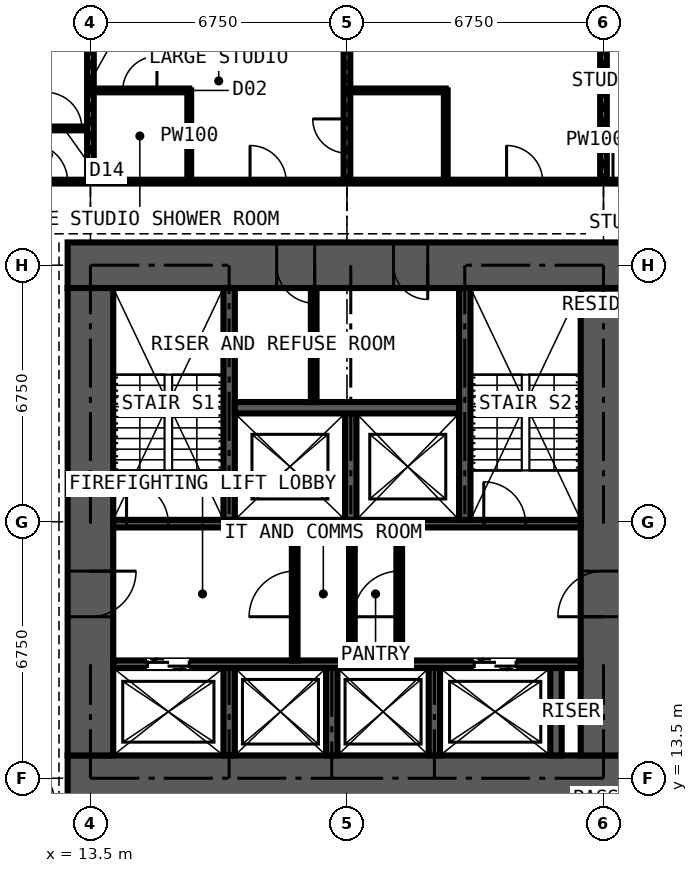
"""IFC4 building model, lengths in metres.
Left out: names, types, materials, properties, quantities, classifications, styles, units other than length and angle.
Written with IfcOpenShell. Run it as: python <this file> out.ifc"""

import sys

from ifc_helpers import new_model, si_unit, direction, frame, frame_2d, origin, place, context, subcontext, project, spatial, rectangle, extrude, element, fill, save


model = new_model("IFC4")
c1 = context("Model", 3, precision=1e-05, world=origin(), true_north=direction((0.0, 1.0)))
c2 = subcontext(c1, "Body", "Model", "MODEL_VIEW")
j1 = project(units=[si_unit("LENGTHUNIT", "METRE"), si_unit("PLANEANGLEUNIT", "RADIAN")], contexts=[c1])
p1 = place(None, origin())
s1 = spatial("IfcSite", under=j1, at=p1, CompositionType="ELEMENT")
p2 = place(p1, origin())
s2 = spatial("IfcBuilding", under=s1, at=p2, CompositionType="ELEMENT")
p3 = place(p2, frame((0.0, 0.0, 112.5)))
s3 = spatial("IfcBuildingStorey", under=s2, at=p3, CompositionType="ELEMENT", Elevation=112.5)
p4 = place(p3, frame((12.9, 13.5, 0.0), z_axis=(0.0, 0.0, 1.0), x_axis=(1.0, 0.0, 0.0)))
e1 = element("IfcWall", 1, at=p4, inside=s3, PredefinedType="SHEAR", context=c2, shape_type="SweptSolid", body=[
    extrude(rectangle(XDim=14.7, YDim=1.2, at=frame_2d((7.35, 0.0))), origin(), (0.0, 0.0, 1.0), 3.6),
])
p5 = place(p3, frame((27.0, 14.1, 0.0), z_axis=(0.0, 0.0, 1.0), x_axis=(0.0, 1.0, 0.0)))
e2 = element("IfcWall", 2, at=p5, inside=s3, PredefinedType="SHEAR", context=c2, shape_type="SweptSolid", body=[
    extrude(rectangle(XDim=12.3, YDim=1.2, at=frame_2d((6.15, 0.0))), origin(), (0.0, 0.0, 1.0), 3.6),
])
p6 = place(p5, frame((3.65, 0.0, 0.0)))
e3 = element("IfcOpeningElement", 3, at=p6, cuts=e2, PredefinedType="OPENING", context=c2, shape_type="SweptSolid", body=[
    extrude(rectangle(XDim=1.2, YDim=2.2, at=frame_2d((0.6, 1.1))), frame((0.0, 0.61, 0.0), z_axis=(0.0, -1.0, 0.0), x_axis=(1.0, 0.0, 0.0)), (0.0, 0.0, 1.0), 1.22),
])
p7 = place(p3, frame((27.6, 27.0, 0.0), z_axis=(0.0, 0.0, 1.0), x_axis=(-1.0, 0.0, 0.0)))
e4 = element("IfcWall", 4, at=p7, inside=s3, PredefinedType="SHEAR", context=c2, shape_type="SweptSolid", body=[
    extrude(rectangle(XDim=14.7, YDim=1.2, at=frame_2d((7.35, 0.0))), origin(), (0.0, 0.0, 1.0), 3.6),
])
p8 = place(p7, frame((5.225, 0.0, 0.0)))
e5 = element("IfcOpeningElement", 5, at=p8, cuts=e4, PredefinedType="OPENING", context=c2, shape_type="SweptSolid", body=[
    extrude(rectangle(XDim=0.9, YDim=2.2, at=frame_2d((0.45, 1.1))), frame((0.0, 0.61, 0.0), z_axis=(0.0, -1.0, 0.0), x_axis=(1.0, 0.0, 0.0)), (0.0, 0.0, 1.0), 1.22),
])
p9 = place(p7, frame((8.2, 0.0, 0.0)))
e6 = element("IfcOpeningElement", 6, at=p9, cuts=e4, PredefinedType="OPENING", context=c2, shape_type="SweptSolid", body=[
    extrude(rectangle(XDim=1.0, YDim=2.2, at=frame_2d((0.5, 1.1))), frame((0.0, 0.61, 0.0), z_axis=(0.0, -1.0, 0.0), x_axis=(1.0, 0.0, 0.0)), (0.0, 0.0, 1.0), 1.22),
])
p10 = place(p3, frame((13.5, 26.4, 0.0), z_axis=(0.0, 0.0, 1.0), x_axis=(0.0, -1.0, 0.0)))
e7 = element("IfcWall", 7, at=p10, inside=s3, PredefinedType="SHEAR", context=c2, shape_type="SweptSolid", body=[
    extrude(rectangle(XDim=12.3, YDim=1.2, at=frame_2d((6.15, 0.0))), origin(), (0.0, 0.0, 1.0), 3.6),
])
p11 = place(p10, frame((7.45, 0.0, 0.0)))
e8 = element("IfcOpeningElement", 8, at=p11, cuts=e7, PredefinedType="OPENING", context=c2, shape_type="SweptSolid", body=[
    extrude(rectangle(XDim=1.2, YDim=2.2, at=frame_2d((0.6, 1.1))), frame((0.0, 0.61, 0.0), z_axis=(0.0, -1.0, 0.0), x_axis=(1.0, 0.0, 0.0)), (0.0, 0.0, 1.0), 1.22),
])
p12 = place(p3, frame((14.1, 16.5, 0.0), z_axis=(0.0, 0.0, 1.0), x_axis=(1.0, 0.0, 0.0)))
e9 = element("IfcWall", 9, at=p12, inside=s3, PredefinedType="SHEAR", context=c2, shape_type="SweptSolid", body=[
    extrude(rectangle(XDim=12.3, YDim=0.2, at=frame_2d((6.15, 0.0))), origin(), (0.0, 0.0, 1.0), 3.6),
])
p13 = place(p12, frame((0.9, 0.0, 0.0)))
e10 = element("IfcOpeningElement", 10, at=p13, cuts=e9, PredefinedType="OPENING", context=c2, shape_type="SweptSolid", body=[
    extrude(rectangle(XDim=1.1, YDim=2.2, at=frame_2d((0.55, 1.1))), frame((0.0, 0.11, 0.0), z_axis=(0.0, -1.0, 0.0), x_axis=(1.0, 0.0, 0.0)), (0.0, 0.0, 1.0), 0.22),
])
p14 = place(p12, frame((9.5, 0.0, 0.0)))
e11 = element("IfcOpeningElement", 11, at=p14, cuts=e9, PredefinedType="OPENING", context=c2, shape_type="SweptSolid", body=[
    extrude(rectangle(XDim=1.1, YDim=2.2, at=frame_2d((0.55, 1.1))), frame((0.0, 0.11, 0.0), z_axis=(0.0, -1.0, 0.0), x_axis=(1.0, 0.0, 0.0)), (0.0, 0.0, 1.0), 0.22),
])
p15 = place(p3, frame((14.1, 20.2, 0.0), z_axis=(0.0, 0.0, 1.0), x_axis=(1.0, 0.0, 0.0)))
e12 = element("IfcWall", 12, at=p15, inside=s3, PredefinedType="SHEAR", context=c2, shape_type="SweptSolid", body=[
    extrude(rectangle(XDim=12.3, YDim=0.2, at=frame_2d((6.15, 0.0))), origin(), (0.0, 0.0, 1.0), 3.6),
])
p16 = place(p15, frame((0.35, 0.0, 0.0)))
e13 = element("IfcOpeningElement", 13, at=p16, cuts=e12, PredefinedType="OPENING", context=c2, shape_type="SweptSolid", body=[
    extrude(rectangle(XDim=1.1, YDim=2.2, at=frame_2d((0.55, 1.1))), frame((0.0, 0.11, 0.0), z_axis=(0.0, -1.0, 0.0), x_axis=(1.0, 0.0, 0.0)), (0.0, 0.0, 1.0), 0.22),
])
p17 = place(p15, frame((9.75, 0.0, 0.0)))
e14 = element("IfcOpeningElement", 14, at=p17, cuts=e12, PredefinedType="OPENING", context=c2, shape_type="SweptSolid", body=[
    extrude(rectangle(XDim=1.1, YDim=2.2, at=frame_2d((0.55, 1.1))), frame((0.0, 0.11, 0.0), z_axis=(0.0, -1.0, 0.0), x_axis=(1.0, 0.0, 0.0)), (0.0, 0.0, 1.0), 0.22),
])
for number, where, z_axis, x_axis in (
    (15, (17.15, 20.3, 0.0), (0.0, 0.0, 1.0), (0.0, 1.0, 0.0)),
    (16, (23.35, 20.3, 0.0), (0.0, 0.0, 1.0), (0.0, 1.0, 0.0)),
):
    element("IfcWall", number, at=place(p3, frame(where, z_axis=z_axis, x_axis=x_axis)), inside=s3, PredefinedType="SHEAR", context=c2, shape_type="SweptSolid", body=[
        extrude(rectangle(XDim=6.1, YDim=0.3, at=frame_2d((3.05, 0.0))), origin(), (0.0, 0.0, 1.0), 3.6),
    ])
p18 = place(p3, frame((20.35, 20.3, 0.0), z_axis=(0.0, 0.0, 1.0), x_axis=(0.0, 1.0, 0.0)))
e17 = element("IfcWall", 17, at=p18, inside=s3, PredefinedType="SHEAR", context=c2, shape_type="SweptSolid", body=[
    extrude(rectangle(XDim=2.8, YDim=0.3, at=frame_2d((1.4, 0.0))), origin(), (0.0, 0.0, 1.0), 3.6),
])
p19 = place(p3, frame((17.3, 23.25, 0.0), z_axis=(0.0, 0.0, 1.0), x_axis=(1.0, 0.0, 0.0)))
e18 = element("IfcWall", 18, at=p19, inside=s3, PredefinedType="SHEAR", context=c2, shape_type="SweptSolid", body=[
    extrude(rectangle(XDim=5.9, YDim=0.3, at=frame_2d((2.95, 0.0))), origin(), (0.0, 0.0, 1.0), 3.6),
])
for number, where, z_axis, x_axis in (
    (19, (17.15, 14.1, 0.0), (0.0, 0.0, 1.0), (0.0, 1.0, 0.0)),
    (20, (19.85, 14.1, 0.0), (0.0, 0.0, 1.0), (0.0, 1.0, 0.0)),
    (21, (22.55, 14.1, 0.0), (0.0, 0.0, 1.0), (0.0, 1.0, 0.0)),
    (22, (25.75, 14.1, 0.0), (0.0, 0.0, 1.0), (0.0, 1.0, 0.0)),
):
    element("IfcWall", number, at=place(p3, frame(where, z_axis=z_axis, x_axis=x_axis)), inside=s3, PredefinedType="SHEAR", context=c2, shape_type="SweptSolid", body=[
        extrude(rectangle(XDim=2.3, YDim=0.3, at=frame_2d((1.15, 0.0))), origin(), (0.0, 0.0, 1.0), 3.6),
    ])
p20 = place(p3, frame((18.875, 16.6, 0.0), z_axis=(0.0, 0.0, 1.0), x_axis=(0.0, 1.0, 0.0)))
e23 = element("IfcWall", 23, at=p20, inside=s3, PredefinedType="PARTITIONING", context=c2, shape_type="SweptSolid", body=[
    extrude(rectangle(XDim=3.5, YDim=0.15, at=frame_2d((1.75, 0.0))), origin(), (0.0, 0.0, 1.0), 3.375),
])
p21 = place(p20, frame((1.15, 0.0, 0.0)))
e24 = element("IfcOpeningElement", 24, at=p21, cuts=e23, PredefinedType="OPENING", context=c2, shape_type="SweptSolid", body=[
    extrude(rectangle(XDim=1.2, YDim=2.2, at=frame_2d((0.6, 1.1))), frame((0.0, 0.085, 0.0), z_axis=(0.0, -1.0, 0.0), x_axis=(1.0, 0.0, 0.0)), (0.0, 0.0, 1.0), 0.17),
])
p22 = place(p3, frame((21.625, 16.6, 0.0), z_axis=(0.0, 0.0, 1.0), x_axis=(0.0, 1.0, 0.0)))
e25 = element("IfcWall", 25, at=p22, inside=s3, PredefinedType="PARTITIONING", context=c2, shape_type="SweptSolid", body=[
    extrude(rectangle(XDim=3.5, YDim=0.15, at=frame_2d((1.75, 0.0))), origin(), (0.0, 0.0, 1.0), 3.375),
])
p23 = place(p22, frame((1.15, 0.0, 0.0)))
e26 = element("IfcOpeningElement", 26, at=p23, cuts=e25, PredefinedType="OPENING", context=c2, shape_type="SweptSolid", body=[
    extrude(rectangle(XDim=1.2, YDim=2.2, at=frame_2d((0.6, 1.1))), frame((0.0, 0.085, 0.0), z_axis=(0.0, -1.0, 0.0), x_axis=(1.0, 0.0, 0.0)), (0.0, 0.0, 1.0), 0.17),
])
p24 = place(p3, frame((20.38, 16.6, 0.0), z_axis=(0.0, 0.0, 1.0), x_axis=(0.0, 1.0, 0.0)))
e27 = element("IfcWall", 27, at=p24, inside=s3, PredefinedType="PARTITIONING", context=c2, shape_type="SweptSolid", body=[
    extrude(rectangle(XDim=3.5, YDim=0.15, at=frame_2d((1.75, 0.0))), origin(), (0.0, 0.0, 1.0), 3.375),
])
p25 = place(p3, frame((19.375, 23.4, 0.0), z_axis=(0.0, 0.0, 1.0), x_axis=(0.0, 1.0, 0.0)))
e28 = element("IfcWall", 28, at=p25, inside=s3, PredefinedType="PARTITIONING", context=c2, shape_type="SweptSolid", body=[
    extrude(rectangle(XDim=3.0, YDim=0.15, at=frame_2d((1.5, 0.0))), origin(), (0.0, 0.0, 1.0), 3.375),
])
p26 = place(p3, frame((10.125, 30.6, 0.0), z_axis=(0.0, 0.0, 1.0), x_axis=(1.0, 0.0, 0.0)))
e29 = element("IfcWall", 29, at=p26, inside=s3, PredefinedType="PARTITIONING", context=c2, shape_type="SweptSolid", body=[
    extrude(rectangle(XDim=3.375, YDim=0.1, at=frame_2d((1.688, 0.0))), origin(), (0.0, 0.0, 1.0), 3.375),
])
p27 = place(p26, frame((2.2, 0.0, 0.0)))
e30 = element("IfcOpeningElement", 30, at=p27, cuts=e29, PredefinedType="OPENING", context=c2, shape_type="SweptSolid", body=[
    extrude(rectangle(XDim=0.95, YDim=2.2, at=frame_2d((0.475, 1.1))), frame((0.0, 0.06, 0.0), z_axis=(0.0, -1.0, 0.0), x_axis=(1.0, 0.0, 0.0)), (0.0, 0.0, 1.0), 0.12),
])
p28 = place(p3, frame((11.3, 29.2, 0.0), z_axis=(0.0, 0.0, 1.0), x_axis=(1.0, 0.0, 0.0)))
e31 = element("IfcWall", 31, at=p28, inside=s3, PredefinedType="PARTITIONING", context=c2, shape_type="SweptSolid", body=[
    extrude(rectangle(XDim=19.075, YDim=0.1, at=frame_2d((9.538, 0.0))), origin(), (0.0, 0.0, 1.0), 3.375),
])
p29 = place(p28, frame((6.4, 0.0, 0.0)))
e32 = element("IfcOpeningElement", 32, at=p29, cuts=e31, PredefinedType="OPENING", context=c2, shape_type="SweptSolid", body=[
    extrude(rectangle(XDim=0.95, YDim=2.2, at=frame_2d((0.475, 1.1))), frame((0.0, 0.06, 0.0), z_axis=(0.0, -1.0, 0.0), x_axis=(1.0, 0.0, 0.0)), (0.0, 0.0, 1.0), 0.12),
])
p30 = place(p28, frame((13.15, 0.0, 0.0)))
e33 = element("IfcOpeningElement", 33, at=p30, cuts=e31, PredefinedType="OPENING", context=c2, shape_type="SweptSolid", body=[
    extrude(rectangle(XDim=0.95, YDim=2.2, at=frame_2d((0.475, 1.1))), frame((0.0, 0.06, 0.0), z_axis=(0.0, -1.0, 0.0), x_axis=(1.0, 0.0, 0.0)), (0.0, 0.0, 1.0), 0.12),
])
p31 = place(p28, frame((15.95, 0.0, 0.0)))
e34 = element("IfcOpeningElement", 34, at=p31, cuts=e31, PredefinedType="OPENING", context=c2, shape_type="SweptSolid", body=[
    extrude(rectangle(XDim=0.95, YDim=2.2, at=frame_2d((0.475, 1.1))), frame((0.0, 0.06, 0.0), z_axis=(0.0, -1.0, 0.0), x_axis=(1.0, 0.0, 0.0)), (0.0, 0.0, 1.0), 0.12),
])
p32 = place(p28, frame((0.6, 0.0, 0.0)))
e35 = element("IfcOpeningElement", 35, at=p32, cuts=e31, PredefinedType="OPENING", context=c2, shape_type="SweptSolid", body=[
    extrude(rectangle(XDim=1.0, YDim=2.2, at=frame_2d((0.5, 1.1))), frame((0.0, 0.06, 0.0), z_axis=(0.0, -1.0, 0.0), x_axis=(1.0, 0.0, 0.0)), (0.0, 0.0, 1.0), 0.12),
])
p33 = place(p3, frame((13.5, 29.2, 0.0), z_axis=(0.0, 0.0, 1.0), x_axis=(0.0, 1.0, 0.0)))
e36 = element("IfcWall", 36, at=p33, inside=s3, PredefinedType="PARTITIONING", context=c2, shape_type="SweptSolid", body=[
    extrude(rectangle(XDim=5.284, YDim=0.175, at=frame_2d((2.642, 0.0))), origin(), (0.0, 0.0, 1.0), 2.61),
])
p34 = place(p3, frame((13.5, 31.6, 0.0), z_axis=(0.0, 0.0, 1.0), x_axis=(1.0, 0.0, 0.0)))
e37 = element("IfcWall", 37, at=p34, inside=s3, PredefinedType="PARTITIONING", context=c2, shape_type="SweptSolid", body=[
    extrude(rectangle(XDim=2.6, YDim=0.1, at=frame_2d((1.3, 0.0))), origin(), (0.0, 0.0, 1.0), 3.375),
])
p35 = place(p34, frame((0.85, 0.0, 0.0)))
e38 = element("IfcOpeningElement", 38, at=p35, cuts=e37, PredefinedType="OPENING", context=c2, shape_type="SweptSolid", body=[
    extrude(rectangle(XDim=0.9, YDim=2.2, at=frame_2d((0.45, 1.1))), frame((0.0, 0.06, 0.0), z_axis=(0.0, -1.0, 0.0), x_axis=(1.0, 0.0, 0.0)), (0.0, 0.0, 1.0), 0.12),
])
p36 = place(p3, frame((16.1, 29.2, 0.0), z_axis=(0.0, 0.0, 1.0), x_axis=(0.0, 1.0, 0.0)))
e39 = element("IfcWall", 39, at=p36, inside=s3, PredefinedType="PARTITIONING", context=c2, shape_type="SweptSolid", body=[
    extrude(rectangle(XDim=2.4, YDim=0.1, at=frame_2d((1.2, 0.0))), origin(), (0.0, 0.0, 1.0), 3.375),
])
p37 = place(p3, frame((20.25, 29.2, 0.0), z_axis=(0.0, 0.0, 1.0), x_axis=(0.0, 1.0, 0.0)))
e40 = element("IfcWall", 40, at=p37, inside=s3, PredefinedType="PARTITIONING", context=c2, shape_type="SweptSolid", body=[
    extrude(rectangle(XDim=5.284, YDim=0.175, at=frame_2d((2.642, 0.0))), origin(), (0.0, 0.0, 1.0), 2.61),
])
p38 = place(p37, frame((0.75, 0.0, 0.0)))
e41 = element("IfcOpeningElement", 41, at=p38, cuts=e40, PredefinedType="OPENING", context=c2, shape_type="SweptSolid", body=[
    extrude(rectangle(XDim=0.9, YDim=2.2, at=frame_2d((0.45, 1.1))), frame((0.0, 0.097, 0.0), z_axis=(0.0, -1.0, 0.0), x_axis=(1.0, 0.0, 0.0)), (0.0, 0.0, 1.0), 0.195),
])
p39 = place(p3, frame((20.25, 31.6, 0.0), z_axis=(0.0, 0.0, 1.0), x_axis=(1.0, 0.0, 0.0)))
e42 = element("IfcWall", 42, at=p39, inside=s3, PredefinedType="PARTITIONING", context=c2, shape_type="SweptSolid", body=[
    extrude(rectangle(XDim=2.6, YDim=0.1, at=frame_2d((1.3, 0.0))), origin(), (0.0, 0.0, 1.0), 3.375),
])
p40 = place(p3, frame((22.85, 29.2, 0.0), z_axis=(0.0, 0.0, 1.0), x_axis=(0.0, 1.0, 0.0)))
e43 = element("IfcWall", 43, at=p40, inside=s3, PredefinedType="PARTITIONING", context=c2, shape_type="SweptSolid", body=[
    extrude(rectangle(XDim=2.4, YDim=0.1, at=frame_2d((1.2, 0.0))), origin(), (0.0, 0.0, 1.0), 3.375),
])
p41 = place(p3, frame((27.0, 29.2, 0.0), z_axis=(0.0, 0.0, 1.0), x_axis=(0.0, 1.0, 0.0)))
e44 = element("IfcWall", 44, at=p41, inside=s3, PredefinedType="PARTITIONING", context=c2, shape_type="SweptSolid", body=[
    extrude(rectangle(XDim=5.284, YDim=0.175, at=frame_2d((2.642, 0.0))), origin(), (0.0, 0.0, 1.0), 2.806),
])
p42 = place(p13, origin())
e45 = element("IfcDoor", 45, at=p42, inside=s3, OperationType="DOUBLE_DOOR_SLIDING", PredefinedType="DOOR", context=c2, shape_type="SweptSolid", body=[
    extrude(rectangle(XDim=1.1, YDim=2.2, at=frame_2d((0.55, 1.1))), frame((0.0, 0.025, 0.0), z_axis=(0.0, -1.0, 0.0), x_axis=(1.0, 0.0, 0.0)), (0.0, 0.0, 1.0), 0.05),
])
fill(e10, e45)
p43 = place(p14, origin())
e46 = element("IfcDoor", 46, at=p43, inside=s3, OperationType="DOUBLE_DOOR_SLIDING", PredefinedType="DOOR", context=c2, shape_type="SweptSolid", body=[
    extrude(rectangle(XDim=1.1, YDim=2.2, at=frame_2d((0.55, 1.1))), frame((0.0, 0.025, 0.0), z_axis=(0.0, -1.0, 0.0), x_axis=(1.0, 0.0, 0.0)), (0.0, 0.0, 1.0), 0.05),
])
fill(e11, e46)
p44 = place(p11, origin())
e47 = element("IfcDoor", 47, at=p44, inside=s3, OperationType="DOUBLE_DOOR_SINGLE_SWING", PredefinedType="DOOR", context=c2, shape_type="SweptSolid", body=[
    extrude(rectangle(XDim=1.2, YDim=2.2, at=frame_2d((0.6, 1.1))), frame((0.0, 0.025, 0.0), z_axis=(0.0, -1.0, 0.0), x_axis=(1.0, 0.0, 0.0)), (0.0, 0.0, 1.0), 0.05),
])
fill(e8, e47)
p45 = place(p6, origin())
e48 = element("IfcDoor", 48, at=p45, inside=s3, OperationType="DOUBLE_DOOR_SINGLE_SWING", PredefinedType="DOOR", context=c2, shape_type="SweptSolid", body=[
    extrude(rectangle(XDim=1.2, YDim=2.2, at=frame_2d((0.6, 1.1))), frame((0.0, 0.025, 0.0), z_axis=(0.0, -1.0, 0.0), x_axis=(1.0, 0.0, 0.0)), (0.0, 0.0, 1.0), 0.05),
])
fill(e3, e48)
p46 = place(p21, origin())
e49 = element("IfcDoor", 49, at=p46, inside=s3, OperationType="DOUBLE_DOOR_SINGLE_SWING", PredefinedType="DOOR", context=c2, shape_type="SweptSolid", body=[
    extrude(rectangle(XDim=1.2, YDim=2.2, at=frame_2d((0.6, 1.1))), frame((0.0, 0.025, 0.0), z_axis=(0.0, -1.0, 0.0), x_axis=(1.0, 0.0, 0.0)), (0.0, 0.0, 1.0), 0.05),
])
fill(e24, e49)
p47 = place(p23, origin())
e50 = element("IfcDoor", 50, at=p47, inside=s3, OperationType="DOUBLE_DOOR_SINGLE_SWING", PredefinedType="DOOR", context=c2, shape_type="SweptSolid", body=[
    extrude(rectangle(XDim=1.2, YDim=2.2, at=frame_2d((0.6, 1.1))), frame((0.0, 0.025, 0.0), z_axis=(0.0, -1.0, 0.0), x_axis=(1.0, 0.0, 0.0)), (0.0, 0.0, 1.0), 0.05),
])
fill(e26, e50)
p48 = place(p8, origin())
e51 = element("IfcDoor", 51, at=p48, inside=s3, OperationType="SINGLE_SWING_LEFT", PredefinedType="DOOR", context=c2, shape_type="SweptSolid", body=[
    extrude(rectangle(XDim=0.9, YDim=2.2, at=frame_2d((0.45, 1.1))), frame((0.0, 0.4, 0.0), z_axis=(0.0, -1.0, 0.0), x_axis=(1.0, 0.0, 0.0)), (0.0, 0.0, 1.0), 0.8),
])
fill(e5, e51)
p49 = place(p9, origin())
e52 = element("IfcDoor", 52, at=p49, inside=s3, OperationType="SINGLE_SWING_LEFT", PredefinedType="DOOR", context=c2, shape_type="SweptSolid", body=[
    extrude(rectangle(XDim=1.0, YDim=2.2, at=frame_2d((0.5, 1.1))), frame((0.0, 0.025, 0.0), z_axis=(0.0, -1.0, 0.0), x_axis=(1.0, 0.0, 0.0)), (0.0, 0.0, 1.0), 0.05),
])
fill(e6, e52)
p50 = place(p16, origin())
e53 = element("IfcDoor", 53, at=p50, inside=s3, OperationType="SINGLE_SWING_LEFT", PredefinedType="DOOR", context=c2, shape_type="SweptSolid", body=[
    extrude(rectangle(XDim=1.1, YDim=2.2, at=frame_2d((0.55, 1.1))), frame((0.0, 0.025, 0.0), z_axis=(0.0, -1.0, 0.0), x_axis=(1.0, 0.0, 0.0)), (0.0, 0.0, 1.0), 0.05),
])
fill(e13, e53)
p51 = place(p17, origin())
e54 = element("IfcDoor", 54, at=p51, inside=s3, OperationType="SINGLE_SWING_LEFT", PredefinedType="DOOR", context=c2, shape_type="SweptSolid", body=[
    extrude(rectangle(XDim=1.1, YDim=2.2, at=frame_2d((0.55, 1.1))), frame((0.0, 0.025, 0.0), z_axis=(0.0, -1.0, 0.0), x_axis=(1.0, 0.0, 0.0)), (0.0, 0.0, 1.0), 0.05),
])
fill(e14, e54)
p52 = place(p29, origin())
e55 = element("IfcDoor", 55, at=p52, inside=s3, OperationType="SINGLE_SWING_LEFT", PredefinedType="DOOR", context=c2, shape_type="SweptSolid", body=[
    extrude(rectangle(XDim=0.95, YDim=2.2, at=frame_2d((0.475, 1.1))), frame((0.0, 0.025, 0.0), z_axis=(0.0, -1.0, 0.0), x_axis=(1.0, 0.0, 0.0)), (0.0, 0.0, 1.0), 0.05),
])
fill(e32, e55)
p53 = place(p35, origin())
e56 = element("IfcDoor", 56, at=p53, inside=s3, OperationType="SINGLE_SWING_RIGHT", PredefinedType="DOOR", context=c2, shape_type="SweptSolid", body=[
    extrude(rectangle(XDim=0.9, YDim=2.2, at=frame_2d((0.45, 1.1))), frame((0.0, 0.025, 0.0), z_axis=(0.0, -1.0, 0.0), x_axis=(1.0, 0.0, 0.0)), (0.0, 0.0, 1.0), 0.05),
])
fill(e38, e56)
p54 = place(p30, origin())
e57 = element("IfcDoor", 57, at=p54, inside=s3, OperationType="SINGLE_SWING_LEFT", PredefinedType="DOOR", context=c2, shape_type="SweptSolid", body=[
    extrude(rectangle(XDim=0.95, YDim=2.2, at=frame_2d((0.475, 1.1))), frame((0.0, 0.025, 0.0), z_axis=(0.0, -1.0, 0.0), x_axis=(1.0, 0.0, 0.0)), (0.0, 0.0, 1.0), 0.05),
])
fill(e33, e57)
p55 = place(p38, origin())
e58 = element("IfcDoor", 58, at=p55, inside=s3, OperationType="SINGLE_SWING_RIGHT", PredefinedType="DOOR", context=c2, shape_type="SweptSolid", body=[
    extrude(rectangle(XDim=0.9, YDim=2.2, at=frame_2d((0.45, 1.1))), frame((0.0, 0.025, 0.0), z_axis=(0.0, -1.0, 0.0), x_axis=(1.0, 0.0, 0.0)), (0.0, 0.0, 1.0), 0.05),
])
fill(e41, e58)
p56 = place(p27, origin())
e59 = element("IfcDoor", 59, at=p56, inside=s3, OperationType="SINGLE_SWING_LEFT", PredefinedType="DOOR", context=c2, shape_type="SweptSolid", body=[
    extrude(rectangle(XDim=0.95, YDim=2.2, at=frame_2d((0.475, 1.1))), frame((0.0, 0.025, 0.0), z_axis=(0.0, -1.0, 0.0), x_axis=(1.0, 0.0, 0.0)), (0.0, 0.0, 1.0), 0.05),
])
fill(e30, e59)
p57 = place(p31, origin())
e60 = element("IfcDoor", 60, at=p57, inside=s3, OperationType="SINGLE_SWING_LEFT", PredefinedType="DOOR", context=c2, shape_type="SweptSolid", body=[
    extrude(rectangle(XDim=0.95, YDim=2.2, at=frame_2d((0.475, 1.1))), frame((0.0, 0.025, 0.0), z_axis=(0.0, -1.0, 0.0), x_axis=(1.0, 0.0, 0.0)), (0.0, 0.0, 1.0), 0.05),
])
fill(e34, e60)
p58 = place(p32, origin())
e61 = element("IfcDoor", 61, at=p58, inside=s3, OperationType="SINGLE_SWING_LEFT", PredefinedType="DOOR", context=c2, shape_type="SweptSolid", body=[
    extrude(rectangle(XDim=1.0, YDim=2.2, at=frame_2d((0.5, 1.1))), frame((0.0, 0.025, 0.0), z_axis=(0.0, -1.0, 0.0), x_axis=(1.0, 0.0, 0.0)), (0.0, 0.0, 1.0), 0.05),
])
fill(e35, e61)
save(model, sys.argv[1])
